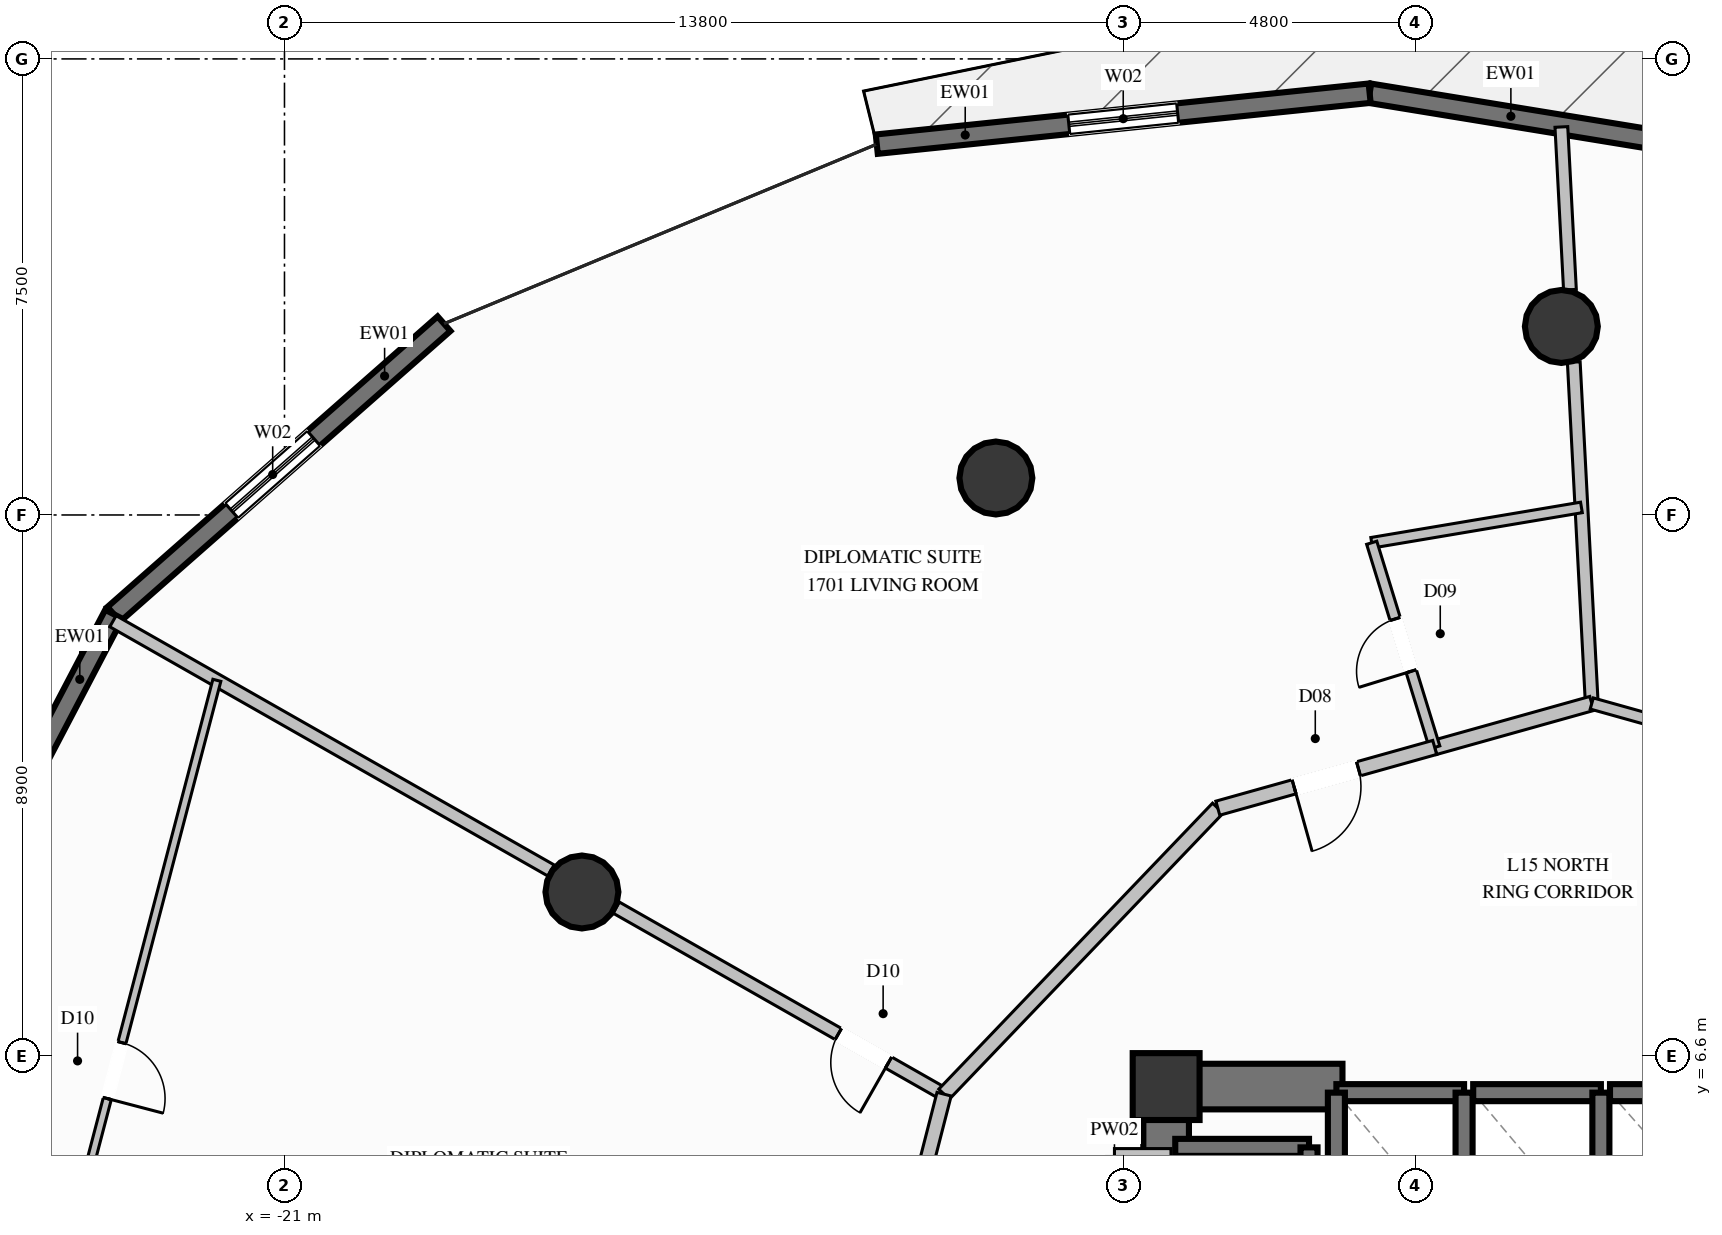
"""IFC4 building model, lengths in metres.
Left out: names, types, materials, properties, quantities, classifications, styles, units other than length and angle.
Written with IfcOpenShell. Run it as: python <this file> out.ifc"""

import sys

from ifc_helpers import new_model, si_unit, direction, frame, frame_2d, origin, origin_2d, place, context, subcontext, project, spatial, rectangle, circle, extrude, element, fill, save


model = new_model("IFC4")
c1 = context("Model", 3, precision=1e-05, world=origin(), true_north=direction((0.0, 1.0)))
c2 = subcontext(c1, "Body", "Model", "MODEL_VIEW")
j1 = project(units=[si_unit("LENGTHUNIT", "METRE"), si_unit("PLANEANGLEUNIT", "RADIAN")], contexts=[c1])
p1 = place(None, origin())
s1 = spatial("IfcSite", under=j1, at=p1, CompositionType="ELEMENT")
p2 = place(p1, origin())
s2 = spatial("IfcBuilding", under=s1, at=p2, CompositionType="ELEMENT")
p3 = place(p2, frame((0.0, 0.0, 64.4)))
s3 = spatial("IfcBuildingStorey", under=s2, at=p3, CompositionType="ELEMENT", Elevation=64.4)
p4 = place(p3, frame((-6.5, 6.1, 0.0), z_axis=(0.0, 0.0, 1.0), x_axis=(1.0, 0.0, 0.0)))
e1 = element("IfcColumn", 1, at=p4, inside=s3, PredefinedType="COLUMN", context=c2, shape_type="SweptSolid", body=[
    extrude(rectangle(XDim=1.1, YDim=1.1, at=origin_2d()), origin(), (0.0, 0.0, 1.0), 3.6),
])
p5 = place(p3, frame((-6.125, 6.1, 0.0), z_axis=(0.0, 0.0, 1.0), x_axis=(1.0, 0.0, 0.0)))
e2 = element("IfcWall", 2, at=p5, inside=s3, PredefinedType="SHEAR", context=c2, shape_type="SweptSolid", body=[
    extrude(rectangle(XDim=2.525, YDim=0.75, at=frame_2d((1.262, 0.0))), origin(), (0.0, 0.0, 1.0), 3.6),
])
p6 = place(p3, frame((-6.5, 2.35, 0.0), z_axis=(0.0, 0.0, 1.0), x_axis=(0.0, 1.0, 0.0)))
e3 = element("IfcWall", 3, at=p6, inside=s3, PredefinedType="SHEAR", context=c2, shape_type="SweptSolid", body=[
    extrude(rectangle(XDim=4.125, YDim=0.75, at=frame_2d((2.062, 0.0))), origin(), (0.0, 0.0, 1.0), 3.6),
])
for number, where, z_axis, x_axis in (
    (4, (0.0, 18.6, 0.0), (0.0, 0.0, 1.0), (1.0, 0.0, 0.0)),
    (5, (-9.3, 16.108, 0.0), (0.0, 0.0, 1.0), (1.0, 0.0, 0.0)),
    (6, (-16.108, 9.3, 0.0), (0.0, 0.0, 1.0), (1.0, 0.0, 0.0)),
):
    element("IfcColumn", number, at=place(p3, frame(where, z_axis=z_axis, x_axis=x_axis)), inside=s3, PredefinedType="COLUMN", context=c2, shape_type="SweptSolid", body=[
        extrude(circle(Radius=0.6, at=origin_2d()), origin(), (0.0, 0.0, 1.0), 3.6),
    ])
p7 = place(p3, frame((-3.153, 22.436, 0.0), z_axis=(0.0, 0.0, 1.0), x_axis=(0.986907440065, -0.161287645973, 0.0)))
e7 = element("IfcWall", 7, at=p7, inside=s3, PredefinedType="SOLIDWALL", context=c2, shape_type="SweptSolid", body=[
    extrude(rectangle(XDim=8.413, YDim=0.32, at=frame_2d((4.207, 0.0))), origin(), (0.0, 0.0, 1.0), 3.34),
])
p8 = place(p7, frame((4.957, 0.0, 0.35)))
e8 = element("IfcOpeningElement", 8, at=p8, cuts=e7, PredefinedType="OPENING", context=c2, shape_type="SweptSolid", body=[
    extrude(rectangle(XDim=1.8, YDim=2.6, at=frame_2d((0.9, 1.3))), frame((0.0, 0.17, 0.0), z_axis=(0.0, -1.0, 0.0), x_axis=(1.0, 0.0, 0.0)), (0.0, 0.0, 1.0), 0.34),
])
p9 = place(p3, frame((-11.259, 21.598, 0.0), z_axis=(0.0, 0.0, 1.0), x_axis=(0.994696973701, 0.102849066644, 0.0)))
e9 = element("IfcWall", 9, at=p9, inside=s3, PredefinedType="SOLIDWALL", context=c2, shape_type="SweptSolid", body=[
    extrude(rectangle(XDim=8.149, YDim=0.32, at=frame_2d((4.075, 0.0))), origin(), (0.0, 0.0, 1.0), 3.34),
])
p10 = place(p9, frame((3.175, 0.0, 0.35)))
e10 = element("IfcOpeningElement", 10, at=p10, cuts=e9, PredefinedType="OPENING", context=c2, shape_type="SweptSolid", body=[
    extrude(rectangle(XDim=1.8, YDim=2.6, at=frame_2d((0.9, 1.3))), frame((0.0, 0.17, 0.0), z_axis=(0.0, -1.0, 0.0), x_axis=(1.0, 0.0, 0.0)), (0.0, 0.0, 1.0), 0.34),
])
p11 = place(p3, frame((-23.806, 13.867, 0.0), z_axis=(0.0, 0.0, 1.0), x_axis=(0.750731596094, 0.660607349812, 0.0)))
e11 = element("IfcWall", 11, at=p11, inside=s3, PredefinedType="SOLIDWALL", context=c2, shape_type="SweptSolid", body=[
    extrude(rectangle(XDim=7.233, YDim=0.32, at=frame_2d((3.616, 0.0))), origin(), (0.0, 0.0, 1.0), 3.34),
])
p12 = place(p11, frame((2.579, 0.0, 0.35)))
e12 = element("IfcOpeningElement", 12, at=p12, cuts=e11, PredefinedType="OPENING", context=c2, shape_type="SweptSolid", body=[
    extrude(rectangle(XDim=1.8, YDim=2.6, at=frame_2d((0.9, 1.3))), frame((0.0, 0.17, 0.0), z_axis=(0.0, -1.0, 0.0), x_axis=(1.0, 0.0, 0.0)), (0.0, 0.0, 1.0), 0.34),
])
p13 = place(p3, frame((-27.019, 7.732, 0.0), z_axis=(0.0, 0.0, 1.0), x_axis=(0.46395693802, 0.885857753628, 0.0)))
e13 = element("IfcWall", 13, at=p13, inside=s3, PredefinedType="SOLIDWALL", context=c2, shape_type="SweptSolid", body=[
    extrude(rectangle(XDim=6.926, YDim=0.32, at=frame_2d((3.463, 0.0))), origin(), (0.0, 0.0, 1.0), 3.34),
])
p14 = place(p13, frame((2.459, 0.0, 0.35)))
e14 = element("IfcOpeningElement", 14, at=p14, cuts=e13, PredefinedType="OPENING", context=c2, shape_type="SweptSolid", body=[
    extrude(rectangle(XDim=1.8, YDim=2.6, at=frame_2d((0.9, 1.3))), frame((0.0, 0.17, 0.0), z_axis=(0.0, -1.0, 0.0), x_axis=(1.0, 0.0, 0.0)), (0.0, 0.0, 1.0), 0.34),
])
p15 = place(p3, frame((-1.6, 6.0, 0.0), z_axis=(0.0, 0.0, 1.0), x_axis=(-1.0, 0.0, 0.0)))
e15 = element("IfcWall", 15, at=p15, inside=s3, PredefinedType="SOLIDWALL", context=c2, shape_type="SweptSolid", body=[
    extrude(rectangle(XDim=2.1, YDim=0.28, at=frame_2d((1.05, 0.0))), origin(), (0.0, 0.0, 1.0), 3.34),
])
for number, where, z_axis, x_axis in (
    (16, (-3.7, 6.0, 0.0), (0.0, 0.0, 1.0), (0.0, -1.0, 0.0)),
    (17, (-1.6, 3.5, 0.0), (0.0, 0.0, 1.0), (0.0, 1.0, 0.0)),
):
    element("IfcWall", number, at=place(p3, frame(where, z_axis=z_axis, x_axis=x_axis)), inside=s3, PredefinedType="SOLIDWALL", context=c2, shape_type="SweptSolid", body=[
        extrude(rectangle(XDim=2.5, YDim=0.28, at=frame_2d((1.25, 0.0))), origin(), (0.0, 0.0, 1.0), 3.34),
    ])
p16 = place(p3, frame((0.65, 6.0, 0.0), z_axis=(0.0, 0.0, 1.0), x_axis=(-1.0, 0.0, 0.0)))
e18 = element("IfcWall", 18, at=p16, inside=s3, PredefinedType="SOLIDWALL", context=c2, shape_type="SweptSolid", body=[
    extrude(rectangle(XDim=2.1, YDim=0.28, at=frame_2d((1.05, 0.0))), origin(), (0.0, 0.0, 1.0), 3.34),
])
p17 = place(p3, frame((0.65, 3.5, 0.0), z_axis=(0.0, 0.0, 1.0), x_axis=(0.0, 1.0, 0.0)))
e19 = element("IfcWall", 19, at=p17, inside=s3, PredefinedType="SOLIDWALL", context=c2, shape_type="SweptSolid", body=[
    extrude(rectangle(XDim=2.5, YDim=0.28, at=frame_2d((1.25, 0.0))), origin(), (0.0, 0.0, 1.0), 3.34),
])
p18 = place(p3, frame((3.0, 6.0, 0.0), z_axis=(0.0, 0.0, 1.0), x_axis=(-1.0, 0.0, 0.0)))
e20 = element("IfcWall", 20, at=p18, inside=s3, PredefinedType="SOLIDWALL", context=c2, shape_type="SweptSolid", body=[
    extrude(rectangle(XDim=2.2, YDim=0.28, at=frame_2d((1.1, 0.0))), origin(), (0.0, 0.0, 1.0), 3.34),
])
p19 = place(p3, frame((-4.15, 5.1, 0.0), z_axis=(0.0, 0.0, 1.0), x_axis=(-1.0, 0.0, 0.0)))
e21 = element("IfcWall", 21, at=p19, inside=s3, PredefinedType="SOLIDWALL", context=c2, shape_type="SweptSolid", body=[
    extrude(rectangle(XDim=2.2, YDim=0.28, at=frame_2d((1.1, 0.0))), origin(), (0.0, 0.0, 1.0), 3.34),
])
p20 = place(p3, frame((-4.15, 2.4, 0.0), z_axis=(0.0, 0.0, 1.0), x_axis=(0.0, 1.0, 0.0)))
e22 = element("IfcWall", 22, at=p20, inside=s3, PredefinedType="SOLIDWALL", context=c2, shape_type="SweptSolid", body=[
    extrude(rectangle(XDim=2.7, YDim=0.28, at=frame_2d((1.35, 0.0))), origin(), (0.0, 0.0, 1.0), 3.34),
])
p21 = place(p3, frame((-7.35, 4.95, 0.0), z_axis=(0.0, 0.0, 1.0), x_axis=(1.0, 0.0, 0.0)))
e23 = element("IfcWall", 23, at=p21, inside=s3, PredefinedType="PARTITIONING", context=c2, shape_type="SweptSolid", body=[
    extrude(rectangle(XDim=0.93, YDim=0.26, at=frame_2d((0.465, 0.0))), origin(), (0.0, 0.0, 1.0), 3.34),
])
p22 = place(p3, frame((0.5, 12.4, 0.0), z_axis=(0.0, 0.0, 1.0), x_axis=(-0.052634051211, 0.998613867645, 0.0)))
e24 = element("IfcWall", 24, at=p22, inside=s3, PredefinedType="PARTITIONING", context=c2, shape_type="SweptSolid", body=[
    extrude(rectangle(XDim=5.622, YDim=0.21, at=frame_2d((2.811, 0.0))), origin(), (0.0, 0.0, 1.0), 2.708),
])
p23 = place(p3, frame((0.141, 19.204, 0.0), z_axis=(0.0, 0.0, 1.0), x_axis=(-0.052640094062, 0.998613549126, 0.0)))
e25 = element("IfcWall", 25, at=p23, inside=s3, PredefinedType="PARTITIONING", context=c2, shape_type="SweptSolid", body=[
    extrude(rectangle(XDim=2.681, YDim=0.21, at=frame_2d((1.34, 0.0))), origin(), (0.0, 0.0, 1.0), 3.34),
])
p24 = place(p3, frame((-10.152, 5.975, 0.0), z_axis=(0.0, 0.0, 1.0), x_axis=(-0.869157123992, 0.494536038944, 0.0)))
e26 = element("IfcWall", 26, at=p24, inside=s3, PredefinedType="PARTITIONING", context=c2, shape_type="SweptSolid", body=[
    extrude(rectangle(XDim=6.204, YDim=0.21, at=frame_2d((3.102, 0.0))), origin(), (0.0, 0.0, 1.0), 2.708),
])
p25 = place(p24, frame((1.051, 0.0, 0.0)))
e27 = element("IfcOpeningElement", 27, at=p25, cuts=e26, PredefinedType="OPENING", context=c2, shape_type="SweptSolid", body=[
    extrude(rectangle(XDim=0.95, YDim=2.1, at=frame_2d((0.475, 1.05))), frame((0.0, 0.115, 0.0), z_axis=(0.0, -1.0, 0.0), x_axis=(1.0, 0.0, 0.0)), (0.0, 0.0, 1.0), 0.23),
])
p26 = place(p3, frame((-16.617, 9.654, 0.0), z_axis=(0.0, 0.0, 1.0), x_axis=(-0.869164268593, 0.494523481951, 0.0)))
e28 = element("IfcWall", 28, at=p26, inside=s3, PredefinedType="PARTITIONING", context=c2, shape_type="SweptSolid", body=[
    extrude(rectangle(XDim=8.289, YDim=0.21, at=frame_2d((4.144, 0.0))), origin(), (0.0, 0.0, 1.0), 3.34),
])
p27 = place(p3, frame((0.5, 12.4, 0.0), z_axis=(0.0, 0.0, 1.0), x_axis=(-0.962997098558, -0.269511758869, 0.0)))
e29 = element("IfcWall", 29, at=p27, inside=s3, PredefinedType="PARTITIONING", context=c2, shape_type="SweptSolid", body=[
    extrude(rectangle(XDim=2.682, YDim=0.24, at=frame_2d((1.341, 0.0))), origin(), (0.0, 0.0, 1.0), 2.917),
])
p28 = place(p3, frame((0.33, 15.624, 0.0), z_axis=(0.0, 0.0, 1.0), x_axis=(-0.986103759575, -0.166130597281, 0.0)))
e30 = element("IfcWall", 30, at=p28, inside=s3, PredefinedType="PLUMBINGWALL", context=c2, shape_type="SweptSolid", body=[
    extrude(rectangle(XDim=3.498, YDim=0.175, at=frame_2d((1.749, 0.0))), origin(), (0.0, 0.0, 1.0), 3.34),
])
p29 = place(p3, frame((-2.083, 11.677, 0.0), z_axis=(0.0, 0.0, 1.0), x_axis=(-0.294139433535, 0.955762519478, 0.0)))
e31 = element("IfcWall", 31, at=p29, inside=s3, PredefinedType="PLUMBINGWALL", context=c2, shape_type="SweptSolid", body=[
    extrude(rectangle(XDim=3.522, YDim=0.175, at=frame_2d((1.761, 0.0))), origin(), (0.0, 0.0, 1.0), 3.34),
])
p30 = place(p29, frame((1.311, 0.0, 0.0)))
e32 = element("IfcOpeningElement", 32, at=p30, cuts=e31, PredefinedType="OPENING", context=c2, shape_type="SweptSolid", body=[
    extrude(rectangle(XDim=0.9, YDim=2.1, at=frame_2d((0.45, 1.05))), frame((0.0, 0.098, 0.0), z_axis=(0.0, -1.0, 0.0), x_axis=(1.0, 0.0, 0.0)), (0.0, 0.0, 1.0), 0.195),
])
p31 = place(p3, frame((-5.65, 10.678, 0.0), z_axis=(0.0, 0.0, 1.0), x_axis=(-0.691526541012, -0.72235105252, 0.0)))
e33 = element("IfcWall", 33, at=p31, inside=s3, PredefinedType="PARTITIONING", context=c2, shape_type="SweptSolid", body=[
    extrude(rectangle(XDim=6.51, YDim=0.24, at=frame_2d((3.255, 0.0))), origin(), (0.0, 0.0, 1.0), 3.34),
])
p32 = place(p3, frame((-2.083, 11.677, 0.0), z_axis=(0.0, 0.0, 1.0), x_axis=(-0.962943481199, -0.269703266603, 0.0)))
e34 = element("IfcWall", 34, at=p32, inside=s3, PredefinedType="PARTITIONING", context=c2, shape_type="SweptSolid", body=[
    extrude(rectangle(XDim=3.704, YDim=0.24, at=frame_2d((1.852, 0.0))), origin(), (0.0, 0.0, 1.0), 2.917),
])
p33 = place(p32, frame((1.302, 0.0, 0.0)))
e35 = element("IfcOpeningElement", 35, at=p33, cuts=e34, PredefinedType="OPENING", context=c2, shape_type="SweptSolid", body=[
    extrude(rectangle(XDim=1.1, YDim=2.3, at=frame_2d((0.55, 1.15))), frame((0.0, 0.13, 0.0), z_axis=(0.0, -1.0, 0.0), x_axis=(1.0, 0.0, 0.0)), (0.0, 0.0, 1.0), 0.26),
])
p34 = place(p3, frame((-10.152, 5.975, 0.0), z_axis=(0.0, 0.0, 1.0), x_axis=(-0.248446193127, -0.968645698447, 0.0)))
e36 = element("IfcWall", 36, at=p34, inside=s3, PredefinedType="PARTITIONING", context=c2, shape_type="SweptSolid", body=[
    extrude(rectangle(XDim=6.633, YDim=0.24, at=frame_2d((3.316, 0.0))), origin(), (0.0, 0.0, 1.0), 3.34),
])
p35 = place(p3, frame((-22.112, 12.781, 0.0), z_axis=(0.0, 0.0, 1.0), x_axis=(-0.253429078168, -0.967353969516, 0.0)))
e37 = element("IfcWall", 37, at=p35, inside=s3, PredefinedType="PARTITIONING", context=c2, shape_type="SweptSolid", body=[
    extrude(rectangle(XDim=13.27, YDim=0.135, at=frame_2d((6.635, 0.0))), origin(), (0.0, 0.0, 1.0), 3.34),
])
p36 = place(p35, frame((6.16, 0.0, 0.0)))
e38 = element("IfcOpeningElement", 38, at=p36, cuts=e37, PredefinedType="OPENING", context=c2, shape_type="SweptSolid", body=[
    extrude(rectangle(XDim=0.95, YDim=2.1, at=frame_2d((0.475, 1.05))), frame((0.0, 0.078, 0.0), z_axis=(0.0, -1.0, 0.0), x_axis=(1.0, 0.0, 0.0)), (0.0, 0.0, 1.0), 0.155),
])
p37 = place(p3, frame((6.65, 10.678, 0.0), z_axis=(0.0, 0.0, 1.0), x_axis=(-0.962966004827, 0.26962283573, 0.0)))
e39 = element("IfcWall", 39, at=p37, inside=s3, PredefinedType="PARTITIONING", context=c2, shape_type="SweptSolid", body=[
    extrude(rectangle(XDim=6.386, YDim=0.19, at=frame_2d((3.193, 0.0))), origin(), (0.0, 0.0, 1.0), 2.917),
])
p38 = place(p37, frame((2.718, 0.0, 0.0)))
e40 = element("IfcOpeningElement", 40, at=p38, cuts=e39, PredefinedType="OPENING", context=c2, shape_type="SweptSolid", body=[
    extrude(rectangle(XDim=0.95, YDim=2.1, at=frame_2d((0.475, 1.05))), frame((0.0, 0.105, 0.0), z_axis=(0.0, -1.0, 0.0), x_axis=(1.0, 0.0, 0.0)), (0.0, 0.0, 1.0), 0.21),
])
p39 = place(p10, origin())
e41 = element("IfcWindow", 41, at=p39, inside=s3, PartitioningType="SINGLE_PANEL", PredefinedType="WINDOW", context=c2, shape_type="SweptSolid", body=[
    extrude(rectangle(XDim=1.8, YDim=2.6, at=frame_2d((0.9, 1.3))), frame((0.0, 0.03, 0.0), z_axis=(0.0, -1.0, 0.0), x_axis=(1.0, 0.0, 0.0)), (0.0, 0.0, 1.0), 0.06),
])
fill(e10, e41)
p40 = place(p12, origin())
e42 = element("IfcWindow", 42, at=p40, inside=s3, PartitioningType="SINGLE_PANEL", PredefinedType="WINDOW", context=c2, shape_type="SweptSolid", body=[
    extrude(rectangle(XDim=1.8, YDim=2.6, at=frame_2d((0.9, 1.3))), frame((0.0, 0.03, 0.0), z_axis=(0.0, -1.0, 0.0), x_axis=(1.0, 0.0, 0.0)), (0.0, 0.0, 1.0), 0.06),
])
fill(e12, e42)
p41 = place(p30, origin())
e43 = element("IfcDoor", 43, at=p41, inside=s3, OperationType="SINGLE_SWING_LEFT", PredefinedType="DOOR", context=c2, shape_type="SweptSolid", body=[
    extrude(rectangle(XDim=0.9, YDim=2.1, at=frame_2d((0.45, 1.05))), frame((0.0, 0.025, 0.0), z_axis=(0.0, -1.0, 0.0), x_axis=(1.0, 0.0, 0.0)), (0.0, 0.0, 1.0), 0.05),
])
fill(e32, e43)
p42 = place(p33, origin())
e44 = element("IfcDoor", 44, at=p42, inside=s3, OperationType="SINGLE_SWING_RIGHT", PredefinedType="DOOR", context=c2, shape_type="SweptSolid", body=[
    extrude(rectangle(XDim=1.1, YDim=2.3, at=frame_2d((0.55, 1.15))), frame((0.0, 0.025, 0.0), z_axis=(0.0, -1.0, 0.0), x_axis=(1.0, 0.0, 0.0)), (0.0, 0.0, 1.0), 0.05),
])
fill(e35, e44)
p43 = place(p25, origin())
e45 = element("IfcDoor", 45, at=p43, inside=s3, OperationType="SINGLE_SWING_LEFT", PredefinedType="DOOR", context=c2, shape_type="SweptSolid", body=[
    extrude(rectangle(XDim=0.95, YDim=2.1, at=frame_2d((0.475, 1.05))), frame((0.0, 0.025, 0.0), z_axis=(0.0, -1.0, 0.0), x_axis=(1.0, 0.0, 0.0)), (0.0, 0.0, 1.0), 0.05),
])
fill(e27, e45)
p44 = place(p36, origin())
e46 = element("IfcDoor", 46, at=p44, inside=s3, OperationType="SINGLE_SWING_RIGHT", PredefinedType="DOOR", context=c2, shape_type="SweptSolid", body=[
    extrude(rectangle(XDim=0.95, YDim=2.1, at=frame_2d((0.475, 1.05))), frame((0.0, 0.025, 0.0), z_axis=(0.0, -1.0, 0.0), x_axis=(1.0, 0.0, 0.0)), (0.0, 0.0, 1.0), 0.05),
])
fill(e38, e46)
save(model, sys.argv[1])
